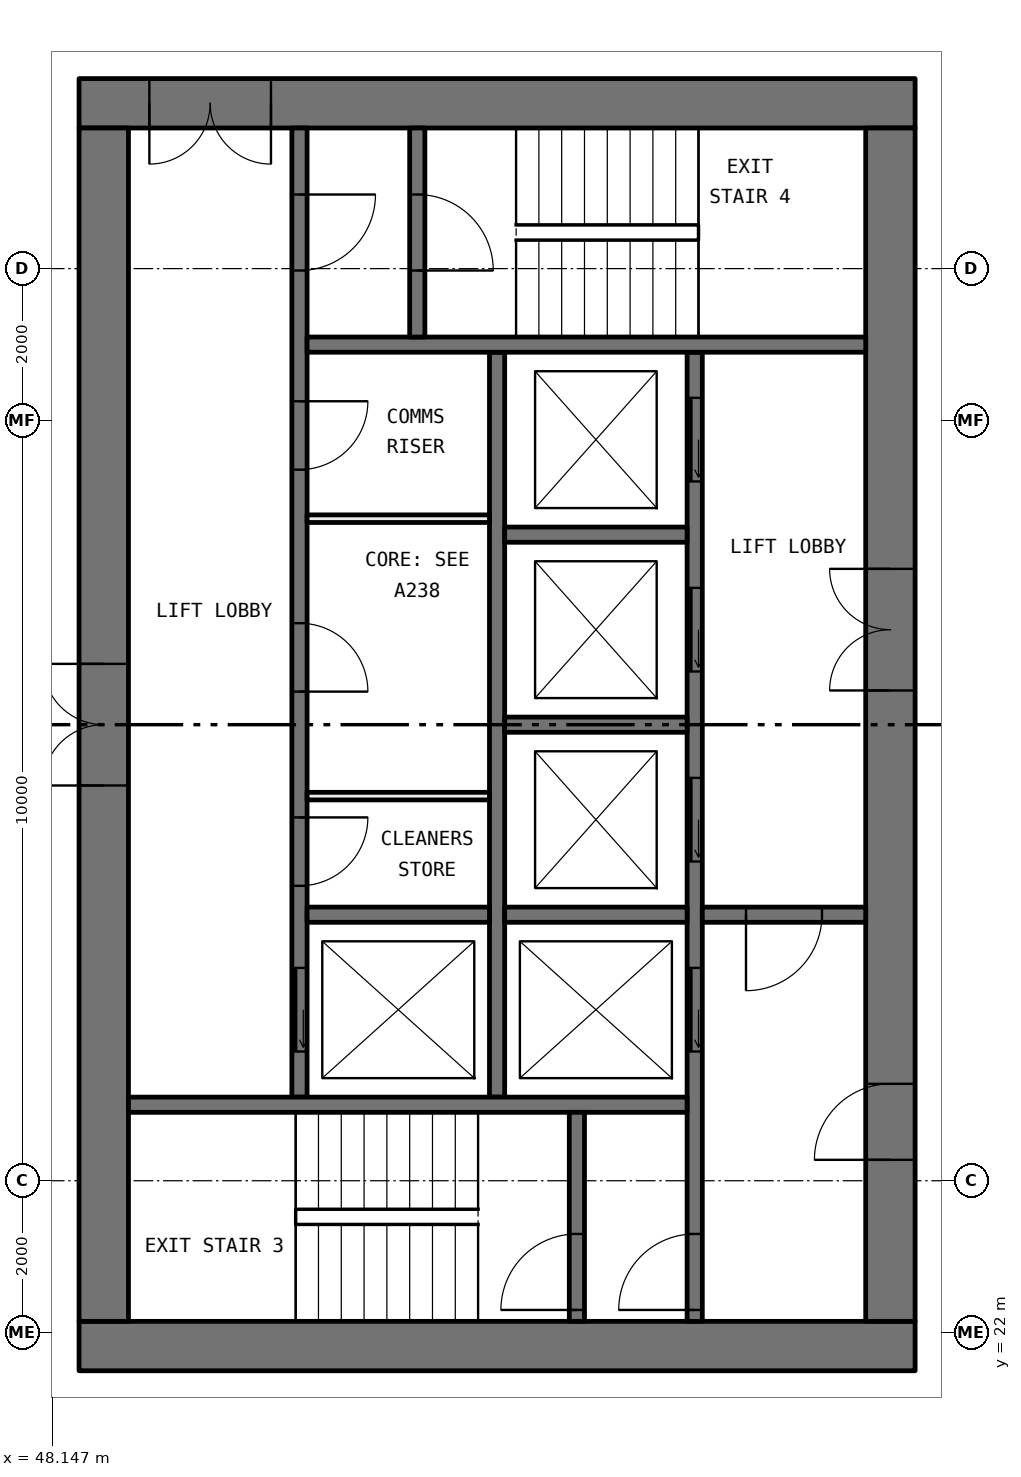
"""IFC4 building model, lengths in metres.
Left out: names, types, materials, properties, quantities, classifications, styles, units other than length and angle.
Written with IfcOpenShell. Run it as: python <this file> out.ifc"""

import sys

from ifc_helpers import new_model, si_unit, direction, frame, frame_2d, origin, place, context, subcontext, project, spatial, rectangle, extrude, element, fill, save


model = new_model("IFC4")
c1 = context("Model", 3, precision=1e-05, world=origin(), true_north=direction((0.0, 1.0)))
c2 = subcontext(c1, "Body", "Model", "MODEL_VIEW")
j1 = project(units=[si_unit("LENGTHUNIT", "METRE"), si_unit("PLANEANGLEUNIT", "RADIAN")], contexts=[c1])
p1 = place(None, origin())
s1 = spatial("IfcSite", under=j1, at=p1, CompositionType="ELEMENT")
p2 = place(p1, origin())
s2 = spatial("IfcBuilding", under=s1, at=p2, CompositionType="ELEMENT")
p3 = place(p2, frame((0.0, 0.0, 141.45)))
s3 = spatial("IfcBuildingStorey", under=s2, at=p3, CompositionType="ELEMENT", Elevation=141.45)
p4 = place(p3, frame((59.5, 21.825, 0.0), z_axis=(0.0, 0.0, 1.0), x_axis=(-1.0, 0.0, 0.0)))
e1 = element("IfcWall", 1, at=p4, inside=s3, PredefinedType="SHEAR", context=c2, shape_type="SweptSolid", body=[
    extrude(rectangle(XDim=11.0, YDim=0.65, at=frame_2d((5.5, 0.0))), origin(), (0.0, 0.0, 1.0), 3.05),
])
p5 = place(p3, frame((59.5, 38.175, 0.0), z_axis=(0.0, 0.0, 1.0), x_axis=(-1.0, 0.0, 0.0)))
e2 = element("IfcWall", 2, at=p5, inside=s3, PredefinedType="SHEAR", context=c2, shape_type="SweptSolid", body=[
    extrude(rectangle(XDim=11.0, YDim=0.65, at=frame_2d((5.5, 0.0))), origin(), (0.0, 0.0, 1.0), 3.05),
])
p6 = place(p5, frame((8.475, 0.0, 0.0)))
e3 = element("IfcOpeningElement", 3, at=p6, cuts=e2, PredefinedType="OPENING", context=c2, shape_type="SweptSolid", body=[
    extrude(rectangle(XDim=1.6, YDim=2.1, at=frame_2d((0.8, 1.05))), frame((0.0, 0.335, 0.0), z_axis=(0.0, -1.0, 0.0), x_axis=(1.0, 0.0, 0.0)), (0.0, 0.0, 1.0), 0.67),
])
p7 = place(p3, frame((59.175, 22.15, 0.0), z_axis=(0.0, 0.0, 1.0), x_axis=(0.0, 1.0, 0.0)))
e4 = element("IfcWall", 4, at=p7, inside=s3, PredefinedType="SHEAR", context=c2, shape_type="SweptSolid", body=[
    extrude(rectangle(XDim=15.7, YDim=0.65, at=frame_2d((7.85, 0.0))), origin(), (0.0, 0.0, 1.0), 3.05),
])
p8 = place(p7, frame((8.3, 0.0, 0.0)))
e5 = element("IfcOpeningElement", 5, at=p8, cuts=e4, PredefinedType="OPENING", context=c2, shape_type="SweptSolid", body=[
    extrude(rectangle(XDim=1.6, YDim=2.1, at=frame_2d((0.8, 1.05))), frame((0.0, 0.335, 0.0), z_axis=(0.0, -1.0, 0.0), x_axis=(1.0, 0.0, 0.0)), (0.0, 0.0, 1.0), 0.67),
])
p9 = place(p7, frame((2.125, 0.0, 0.0)))
e6 = element("IfcOpeningElement", 6, at=p9, cuts=e4, PredefinedType="OPENING", context=c2, shape_type="SweptSolid", body=[
    extrude(rectangle(XDim=1.0, YDim=2.1, at=frame_2d((0.5, 1.05))), frame((0.0, 0.335, 0.0), z_axis=(0.0, -1.0, 0.0), x_axis=(1.0, 0.0, 0.0)), (0.0, 0.0, 1.0), 0.67),
])
p10 = place(p3, frame((48.825, 22.15, 0.0), z_axis=(0.0, 0.0, 1.0), x_axis=(0.0, 1.0, 0.0)))
e7 = element("IfcWall", 7, at=p10, inside=s3, PredefinedType="SHEAR", context=c2, shape_type="SweptSolid", body=[
    extrude(rectangle(XDim=15.7, YDim=0.65, at=frame_2d((7.85, 0.0))), origin(), (0.0, 0.0, 1.0), 3.05),
])
p11 = place(p10, frame((7.05, 0.0, 0.0)))
e8 = element("IfcOpeningElement", 8, at=p11, cuts=e7, PredefinedType="OPENING", context=c2, shape_type="SweptSolid", body=[
    extrude(rectangle(XDim=1.6, YDim=2.1, at=frame_2d((0.8, 1.05))), frame((0.0, 0.335, 0.0), z_axis=(0.0, -1.0, 0.0), x_axis=(1.0, 0.0, 0.0)), (0.0, 0.0, 1.0), 0.67),
])
p12 = place(p3, frame((56.6, 22.15, 0.0), z_axis=(0.0, 0.0, 1.0), x_axis=(0.0, 1.0, 0.0)))
e9 = element("IfcWall", 9, at=p12, inside=s3, PredefinedType="SOLIDWALL", context=c2, shape_type="SweptSolid", body=[
    extrude(rectangle(XDim=12.75, YDim=0.2, at=frame_2d((6.375, 0.0))), origin(), (0.0, 0.0, 1.0), 3.05),
])
p13 = place(p12, frame((3.55, 0.0, 0.0)))
e10 = element("IfcOpeningElement", 10, at=p13, cuts=e9, PredefinedType="OPENING", context=c2, shape_type="SweptSolid", body=[
    extrude(rectangle(XDim=1.1, YDim=2.1, at=frame_2d((0.55, 1.05))), frame((0.0, 0.11, 0.0), z_axis=(0.0, -1.0, 0.0), x_axis=(1.0, 0.0, 0.0)), (0.0, 0.0, 1.0), 0.22),
])
p14 = place(p12, frame((6.05, 0.0, 0.0)))
e11 = element("IfcOpeningElement", 11, at=p14, cuts=e9, PredefinedType="OPENING", context=c2, shape_type="SweptSolid", body=[
    extrude(rectangle(XDim=1.1, YDim=2.1, at=frame_2d((0.55, 1.05))), frame((0.0, 0.11, 0.0), z_axis=(0.0, -1.0, 0.0), x_axis=(1.0, 0.0, 0.0)), (0.0, 0.0, 1.0), 0.22),
])
p15 = place(p12, frame((8.55, 0.0, 0.0)))
e12 = element("IfcOpeningElement", 12, at=p15, cuts=e9, PredefinedType="OPENING", context=c2, shape_type="SweptSolid", body=[
    extrude(rectangle(XDim=1.1, YDim=2.1, at=frame_2d((0.55, 1.05))), frame((0.0, 0.11, 0.0), z_axis=(0.0, -1.0, 0.0), x_axis=(1.0, 0.0, 0.0)), (0.0, 0.0, 1.0), 0.22),
])
p16 = place(p12, frame((11.05, 0.0, 0.0)))
e13 = element("IfcOpeningElement", 13, at=p16, cuts=e9, PredefinedType="OPENING", context=c2, shape_type="SweptSolid", body=[
    extrude(rectangle(XDim=1.1, YDim=2.1, at=frame_2d((0.55, 1.05))), frame((0.0, 0.11, 0.0), z_axis=(0.0, -1.0, 0.0), x_axis=(1.0, 0.0, 0.0)), (0.0, 0.0, 1.0), 0.22),
])
p17 = place(p12, frame((0.15, 0.0, 0.0)))
e14 = element("IfcOpeningElement", 14, at=p17, cuts=e9, PredefinedType="OPENING", context=c2, shape_type="SweptSolid", body=[
    extrude(rectangle(XDim=1.0, YDim=2.1, at=frame_2d((0.5, 1.05))), frame((0.0, 0.11, 0.0), z_axis=(0.0, -1.0, 0.0), x_axis=(1.0, 0.0, 0.0)), (0.0, 0.0, 1.0), 0.22),
])
p18 = place(p3, frame((51.4, 25.1, 0.0), z_axis=(0.0, 0.0, 1.0), x_axis=(0.0, 1.0, 0.0)))
e15 = element("IfcWall", 15, at=p18, inside=s3, PredefinedType="SOLIDWALL", context=c2, shape_type="SweptSolid", body=[
    extrude(rectangle(XDim=12.75, YDim=0.2, at=frame_2d((6.375, 0.0))), origin(), (0.0, 0.0, 1.0), 3.05),
])
p19 = place(p18, frame((0.6, 0.0, 0.0)))
e16 = element("IfcOpeningElement", 16, at=p19, cuts=e15, PredefinedType="OPENING", context=c2, shape_type="SweptSolid", body=[
    extrude(rectangle(XDim=1.1, YDim=2.1, at=frame_2d((0.55, 1.05))), frame((0.0, 0.11, 0.0), z_axis=(0.0, -1.0, 0.0), x_axis=(1.0, 0.0, 0.0)), (0.0, 0.0, 1.0), 0.22),
])
p20 = place(p18, frame((10.875, 0.0, 0.0)))
e17 = element("IfcOpeningElement", 17, at=p20, cuts=e15, PredefinedType="OPENING", context=c2, shape_type="SweptSolid", body=[
    extrude(rectangle(XDim=1.0, YDim=2.1, at=frame_2d((0.5, 1.05))), frame((0.0, 0.11, 0.0), z_axis=(0.0, -1.0, 0.0), x_axis=(1.0, 0.0, 0.0)), (0.0, 0.0, 1.0), 0.22),
])
p21 = place(p18, frame((2.78, 0.0, 0.0)))
e18 = element("IfcOpeningElement", 18, at=p21, cuts=e15, PredefinedType="OPENING", context=c2, shape_type="SweptSolid", body=[
    extrude(rectangle(XDim=0.9, YDim=2.1, at=frame_2d((0.45, 1.05))), frame((0.0, 0.11, 0.0), z_axis=(0.0, -1.0, 0.0), x_axis=(1.0, 0.0, 0.0)), (0.0, 0.0, 1.0), 0.22),
])
p22 = place(p18, frame((5.335, 0.0, 0.0)))
e19 = element("IfcOpeningElement", 19, at=p22, cuts=e15, PredefinedType="OPENING", context=c2, shape_type="SweptSolid", body=[
    extrude(rectangle(XDim=0.9, YDim=2.1, at=frame_2d((0.45, 1.05))), frame((0.0, 0.11, 0.0), z_axis=(0.0, -1.0, 0.0), x_axis=(1.0, 0.0, 0.0)), (0.0, 0.0, 1.0), 0.22),
])
p23 = place(p18, frame((8.255, 0.0, 0.0)))
e20 = element("IfcOpeningElement", 20, at=p23, cuts=e15, PredefinedType="OPENING", context=c2, shape_type="SweptSolid", body=[
    extrude(rectangle(XDim=0.9, YDim=2.1, at=frame_2d((0.45, 1.05))), frame((0.0, 0.11, 0.0), z_axis=(0.0, -1.0, 0.0), x_axis=(1.0, 0.0, 0.0)), (0.0, 0.0, 1.0), 0.22),
])
p24 = place(p3, frame((54.0, 25.1, 0.0), z_axis=(0.0, 0.0, 1.0), x_axis=(0.0, 1.0, 0.0)))
e21 = element("IfcWall", 21, at=p24, inside=s3, PredefinedType="SOLIDWALL", context=c2, shape_type="SweptSolid", body=[
    extrude(rectangle(XDim=9.8, YDim=0.2, at=frame_2d((4.9, 0.0))), origin(), (0.0, 0.0, 1.0), 3.05),
])
for number, where, z_axis, x_axis in (
    (22, (56.5, 25.0, 0.0), (0.0, 0.0, 1.0), (-1.0, 0.0, 0.0)),
    (23, (58.85, 35.0, 0.0), (0.0, 0.0, 1.0), (-1.0, 0.0, 0.0)),
):
    element("IfcWall", number, at=place(p3, frame(where, z_axis=z_axis, x_axis=x_axis)), inside=s3, PredefinedType="SOLIDWALL", context=c2, shape_type="SweptSolid", body=[
        extrude(rectangle(XDim=7.35, YDim=0.2, at=frame_2d((3.675, 0.0))), origin(), (0.0, 0.0, 1.0), 3.05),
    ])
p25 = place(p3, frame((58.85, 27.5, 0.0), z_axis=(0.0, 0.0, 1.0), x_axis=(-1.0, 0.0, 0.0)))
e24 = element("IfcWall", 24, at=p25, inside=s3, PredefinedType="SOLIDWALL", context=c2, shape_type="SweptSolid", body=[
    extrude(rectangle(XDim=2.15, YDim=0.2, at=frame_2d((1.075, 0.0))), origin(), (0.0, 0.0, 1.0), 3.05),
])
p26 = place(p25, frame((0.575, 0.0, 0.0)))
e25 = element("IfcOpeningElement", 25, at=p26, cuts=e24, PredefinedType="OPENING", context=c2, shape_type="SweptSolid", body=[
    extrude(rectangle(XDim=1.0, YDim=2.1, at=frame_2d((0.5, 1.05))), frame((0.0, 0.11, 0.0), z_axis=(0.0, -1.0, 0.0), x_axis=(1.0, 0.0, 0.0)), (0.0, 0.0, 1.0), 0.22),
])
p27 = place(p3, frame((55.05, 22.15, 0.0), z_axis=(0.0, 0.0, 1.0), x_axis=(0.0, 1.0, 0.0)))
e26 = element("IfcWall", 26, at=p27, inside=s3, PredefinedType="SOLIDWALL", context=c2, shape_type="SweptSolid", body=[
    extrude(rectangle(XDim=2.75, YDim=0.2, at=frame_2d((1.375, 0.0))), origin(), (0.0, 0.0, 1.0), 3.05),
])
p28 = place(p27, frame((0.15, 0.0, 0.0)))
e27 = element("IfcOpeningElement", 27, at=p28, cuts=e26, PredefinedType="OPENING", context=c2, shape_type="SweptSolid", body=[
    extrude(rectangle(XDim=1.0, YDim=2.1, at=frame_2d((0.5, 1.05))), frame((0.0, 0.11, 0.0), z_axis=(0.0, -1.0, 0.0), x_axis=(1.0, 0.0, 0.0)), (0.0, 0.0, 1.0), 0.22),
])
p29 = place(p3, frame((52.95, 35.1, 0.0), z_axis=(0.0, 0.0, 1.0), x_axis=(0.0, 1.0, 0.0)))
e28 = element("IfcWall", 28, at=p29, inside=s3, PredefinedType="SOLIDWALL", context=c2, shape_type="SweptSolid", body=[
    extrude(rectangle(XDim=2.75, YDim=0.2, at=frame_2d((1.375, 0.0))), origin(), (0.0, 0.0, 1.0), 3.05),
])
p30 = place(p29, frame((0.875, 0.0, 0.0)))
e29 = element("IfcOpeningElement", 29, at=p30, cuts=e28, PredefinedType="OPENING", context=c2, shape_type="SweptSolid", body=[
    extrude(rectangle(XDim=1.0, YDim=2.1, at=frame_2d((0.5, 1.05))), frame((0.0, 0.11, 0.0), z_axis=(0.0, -1.0, 0.0), x_axis=(1.0, 0.0, 0.0)), (0.0, 0.0, 1.0), 0.22),
])
for number, where, z_axis, x_axis in (
    (30, (56.5, 27.5, 0.0), (0.0, 0.0, 1.0), (-1.0, 0.0, 0.0)),
    (31, (56.5, 30.0, 0.0), (0.0, 0.0, 1.0), (-1.0, 0.0, 0.0)),
    (32, (56.5, 32.5, 0.0), (0.0, 0.0, 1.0), (-1.0, 0.0, 0.0)),
    (33, (53.9, 27.5, 0.0), (0.0, 0.0, 1.0), (-1.0, 0.0, 0.0)),
):
    element("IfcWall", number, at=place(p3, frame(where, z_axis=z_axis, x_axis=x_axis)), inside=s3, PredefinedType="SOLIDWALL", context=c2, shape_type="SweptSolid", body=[
        extrude(rectangle(XDim=2.4, YDim=0.2, at=frame_2d((1.2, 0.0))), origin(), (0.0, 0.0, 1.0), 3.05),
    ])
for number, where, z_axis, x_axis in (
    (34, (53.9, 29.06, 0.0), (0.0, 0.0, 1.0), (-1.0, 0.0, 0.0)),
    (35, (53.9, 32.71, 0.0), (0.0, 0.0, 1.0), (-1.0, 0.0, 0.0)),
):
    element("IfcWall", number, at=place(p3, frame(where, z_axis=z_axis, x_axis=x_axis)), inside=s3, PredefinedType="PARTITIONING", context=c2, shape_type="SweptSolid", body=[
        extrude(rectangle(XDim=2.4, YDim=0.1, at=frame_2d((1.2, 0.0))), origin(), (0.0, 0.0, 1.0), 3.05),
    ])
p31 = place(p19, origin())
e36 = element("IfcDoor", 36, at=p31, inside=s3, OperationType="SLIDING_TO_LEFT", PredefinedType="DOOR", context=c2, shape_type="SweptSolid", body=[
    extrude(rectangle(XDim=1.1, YDim=2.1, at=frame_2d((0.55, 1.05))), frame((0.0, 0.025, 0.0), z_axis=(0.0, -1.0, 0.0), x_axis=(1.0, 0.0, 0.0)), (0.0, 0.0, 1.0), 0.05),
])
fill(e16, e36)
p32 = place(p13, origin())
e37 = element("IfcDoor", 37, at=p32, inside=s3, OperationType="SLIDING_TO_LEFT", PredefinedType="DOOR", context=c2, shape_type="SweptSolid", body=[
    extrude(rectangle(XDim=1.1, YDim=2.1, at=frame_2d((0.55, 1.05))), frame((0.0, 0.025, 0.0), z_axis=(0.0, -1.0, 0.0), x_axis=(1.0, 0.0, 0.0)), (0.0, 0.0, 1.0), 0.05),
])
fill(e10, e37)
p33 = place(p14, origin())
e38 = element("IfcDoor", 38, at=p33, inside=s3, OperationType="SLIDING_TO_LEFT", PredefinedType="DOOR", context=c2, shape_type="SweptSolid", body=[
    extrude(rectangle(XDim=1.1, YDim=2.1, at=frame_2d((0.55, 1.05))), frame((0.0, 0.025, 0.0), z_axis=(0.0, -1.0, 0.0), x_axis=(1.0, 0.0, 0.0)), (0.0, 0.0, 1.0), 0.05),
])
fill(e11, e38)
p34 = place(p15, origin())
e39 = element("IfcDoor", 39, at=p34, inside=s3, OperationType="SLIDING_TO_LEFT", PredefinedType="DOOR", context=c2, shape_type="SweptSolid", body=[
    extrude(rectangle(XDim=1.1, YDim=2.1, at=frame_2d((0.55, 1.05))), frame((0.0, 0.025, 0.0), z_axis=(0.0, -1.0, 0.0), x_axis=(1.0, 0.0, 0.0)), (0.0, 0.0, 1.0), 0.05),
])
fill(e12, e39)
p35 = place(p16, origin())
e40 = element("IfcDoor", 40, at=p35, inside=s3, OperationType="SLIDING_TO_LEFT", PredefinedType="DOOR", context=c2, shape_type="SweptSolid", body=[
    extrude(rectangle(XDim=1.1, YDim=2.1, at=frame_2d((0.55, 1.05))), frame((0.0, 0.025, 0.0), z_axis=(0.0, -1.0, 0.0), x_axis=(1.0, 0.0, 0.0)), (0.0, 0.0, 1.0), 0.05),
])
fill(e13, e40)
p36 = place(p28, origin())
e41 = element("IfcDoor", 41, at=p36, inside=s3, OperationType="SINGLE_SWING_RIGHT", PredefinedType="DOOR", context=c2, shape_type="SweptSolid", body=[
    extrude(rectangle(XDim=1.0, YDim=2.1, at=frame_2d((0.5, 1.05))), frame((0.0, 0.025, 0.0), z_axis=(0.0, -1.0, 0.0), x_axis=(1.0, 0.0, 0.0)), (0.0, 0.0, 1.0), 0.05),
])
fill(e27, e41)
p37 = place(p17, origin())
e42 = element("IfcDoor", 42, at=p37, inside=s3, OperationType="SINGLE_SWING_RIGHT", PredefinedType="DOOR", context=c2, shape_type="SweptSolid", body=[
    extrude(rectangle(XDim=1.0, YDim=2.1, at=frame_2d((0.5, 1.05))), frame((0.0, 0.025, 0.0), z_axis=(0.0, -1.0, 0.0), x_axis=(1.0, 0.0, 0.0)), (0.0, 0.0, 1.0), 0.05),
])
fill(e14, e42)
p38 = place(p20, frame((1.0, 0.0, 0.0), x_axis=(-1.0, 0.0, 0.0)))
e43 = element("IfcDoor", 43, at=p38, inside=s3, OperationType="SINGLE_SWING_RIGHT", PredefinedType="DOOR", context=c2, shape_type="SweptSolid", body=[
    extrude(rectangle(XDim=1.0, YDim=2.1, at=frame_2d((0.5, 1.05))), frame((0.0, 0.025, 0.0), z_axis=(0.0, -1.0, 0.0), x_axis=(1.0, 0.0, 0.0)), (0.0, 0.0, 1.0), 0.05),
])
fill(e17, e43)
p39 = place(p30, frame((1.0, 0.0, 0.0), x_axis=(-1.0, 0.0, 0.0)))
e44 = element("IfcDoor", 44, at=p39, inside=s3, OperationType="SINGLE_SWING_LEFT", PredefinedType="DOOR", context=c2, shape_type="SweptSolid", body=[
    extrude(rectangle(XDim=1.0, YDim=2.1, at=frame_2d((0.5, 1.05))), frame((0.0, 0.025, 0.0), z_axis=(0.0, -1.0, 0.0), x_axis=(1.0, 0.0, 0.0)), (0.0, 0.0, 1.0), 0.05),
])
fill(e29, e44)
p40 = place(p26, origin())
e45 = element("IfcDoor", 45, at=p40, inside=s3, OperationType="SINGLE_SWING_LEFT", PredefinedType="DOOR", context=c2, shape_type="SweptSolid", body=[
    extrude(rectangle(XDim=1.0, YDim=2.1, at=frame_2d((0.5, 1.05))), frame((0.0, 0.025, 0.0), z_axis=(0.0, -1.0, 0.0), x_axis=(1.0, 0.0, 0.0)), (0.0, 0.0, 1.0), 0.05),
])
fill(e25, e45)
p41 = place(p8, origin())
e46 = element("IfcDoor", 46, at=p41, inside=s3, OperationType="DOUBLE_DOOR_SINGLE_SWING", PredefinedType="DOOR", context=c2, shape_type="SweptSolid", body=[
    extrude(rectangle(XDim=1.6, YDim=2.1, at=frame_2d((0.8, 1.05))), frame((0.0, 0.025, 0.0), z_axis=(0.0, -1.0, 0.0), x_axis=(1.0, 0.0, 0.0)), (0.0, 0.0, 1.0), 0.05),
])
fill(e5, e46)
p42 = place(p9, origin())
e47 = element("IfcDoor", 47, at=p42, inside=s3, OperationType="SINGLE_SWING_RIGHT", PredefinedType="DOOR", context=c2, shape_type="SweptSolid", body=[
    extrude(rectangle(XDim=1.0, YDim=2.1, at=frame_2d((0.5, 1.05))), frame((0.0, 0.025, 0.0), z_axis=(0.0, -1.0, 0.0), x_axis=(1.0, 0.0, 0.0)), (0.0, 0.0, 1.0), 0.05),
])
fill(e6, e47)
p43 = place(p6, origin())
e48 = element("IfcDoor", 48, at=p43, inside=s3, OperationType="DOUBLE_DOOR_SINGLE_SWING", PredefinedType="DOOR", context=c2, shape_type="SweptSolid", body=[
    extrude(rectangle(XDim=1.6, YDim=2.1, at=frame_2d((0.8, 1.05))), frame((0.0, 0.025, 0.0), z_axis=(0.0, -1.0, 0.0), x_axis=(1.0, 0.0, 0.0)), (0.0, 0.0, 1.0), 0.05),
])
fill(e3, e48)
p44 = place(p11, origin())
e49 = element("IfcDoor", 49, at=p44, inside=s3, OperationType="DOUBLE_DOOR_SINGLE_SWING", PredefinedType="DOOR", context=c2, shape_type="SweptSolid", body=[
    extrude(rectangle(XDim=1.6, YDim=2.1, at=frame_2d((0.8, 1.05))), frame((0.0, 0.025, 0.0), z_axis=(0.0, -1.0, 0.0), x_axis=(1.0, 0.0, 0.0)), (0.0, 0.0, 1.0), 0.05),
])
fill(e8, e49)
p45 = place(p21, frame((0.9, 0.0, 0.0), x_axis=(-1.0, 0.0, 0.0)))
e50 = element("IfcDoor", 50, at=p45, inside=s3, OperationType="SINGLE_SWING_RIGHT", PredefinedType="DOOR", context=c2, shape_type="SweptSolid", body=[
    extrude(rectangle(XDim=0.9, YDim=2.1, at=frame_2d((0.45, 1.05))), frame((0.0, 0.025, 0.0), z_axis=(0.0, -1.0, 0.0), x_axis=(1.0, 0.0, 0.0)), (0.0, 0.0, 1.0), 0.05),
])
fill(e18, e50)
p46 = place(p22, frame((0.9, 0.0, 0.0), x_axis=(-1.0, 0.0, 0.0)))
e51 = element("IfcDoor", 51, at=p46, inside=s3, OperationType="SINGLE_SWING_LEFT", PredefinedType="DOOR", context=c2, shape_type="SweptSolid", body=[
    extrude(rectangle(XDim=0.9, YDim=2.1, at=frame_2d((0.45, 1.05))), frame((0.0, 0.025, 0.0), z_axis=(0.0, -1.0, 0.0), x_axis=(1.0, 0.0, 0.0)), (0.0, 0.0, 1.0), 0.05),
])
fill(e19, e51)
p47 = place(p23, frame((0.9, 0.0, 0.0), x_axis=(-1.0, 0.0, 0.0)))
e52 = element("IfcDoor", 52, at=p47, inside=s3, OperationType="SINGLE_SWING_RIGHT", PredefinedType="DOOR", context=c2, shape_type="SweptSolid", body=[
    extrude(rectangle(XDim=0.9, YDim=2.1, at=frame_2d((0.45, 1.05))), frame((0.0, 0.025, 0.0), z_axis=(0.0, -1.0, 0.0), x_axis=(1.0, 0.0, 0.0)), (0.0, 0.0, 1.0), 0.05),
])
fill(e20, e52)
save(model, sys.argv[1])
